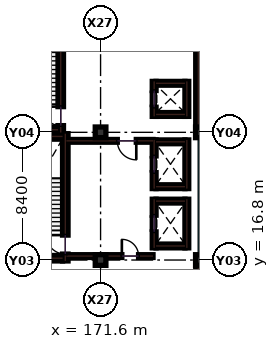
"""IFC4 building model, lengths in metres.
Left out: names, types, materials, properties, quantities, classifications, styles, units other than length and angle.
Written with IfcOpenShell. Run it as: python <this file> out.ifc"""

import sys

from ifc_helpers import new_model, si_unit, direction, frame, frame_2d, origin, origin_2d, place, context, subcontext, project, spatial, rectangle, extrude, element, fill, save


model = new_model("IFC4")
c1 = context("Model", 3, precision=1e-05, world=origin(), true_north=direction((0.0, 1.0)))
c2 = subcontext(c1, "Body", "Model", "MODEL_VIEW")
j1 = project(units=[si_unit("LENGTHUNIT", "METRE"), si_unit("PLANEANGLEUNIT", "RADIAN")], contexts=[c1])
p1 = place(None, origin())
s1 = spatial("IfcSite", under=j1, at=p1, CompositionType="ELEMENT")
p2 = place(p1, origin())
s2 = spatial("IfcBuilding", under=s1, at=p2, CompositionType="ELEMENT")
p3 = place(p2, frame((0.0, 0.0, 27.0)))
s3 = spatial("IfcBuildingStorey", under=s2, at=p3, CompositionType="ELEMENT", Elevation=27.0)
for number, where, z_axis, x_axis in (
    (1, (171.6, 16.8, 0.0), (0.0, 0.0, 1.0), (1.0, 0.0, 0.0)),
    (2, (171.6, 25.2, 0.0), (0.0, 0.0, 1.0), (1.0, 0.0, 0.0)),
    (3, (178.2, 16.8, 0.0), (0.0, 0.0, 1.0), (1.0, 0.0, 0.0)),
    (4, (178.2, 25.2, 0.0), (0.0, 0.0, 1.0), (1.0, 0.0, 0.0)),
):
    element("IfcColumn", number, at=place(p3, frame(where, z_axis=z_axis, x_axis=x_axis)), inside=s3, PredefinedType="COLUMN", context=c2, shape_type="SweptSolid", body=[
        extrude(rectangle(XDim=0.7, YDim=0.7, at=origin_2d()), origin(), (0.0, 0.0, 1.0), 4.2),
    ])
for number, where, z_axis, x_axis in (
    (5, (178.03, 8.745, 0.0), (0.0, 0.0, 1.0), (0.0, 1.0, 0.0)),
    (6, (178.03, 25.545, 0.0), (0.0, 0.0, 1.0), (0.0, 1.0, 0.0)),
):
    element("IfcWall", number, at=place(p3, frame(where, z_axis=z_axis, x_axis=x_axis)), inside=s3, PredefinedType="SHEAR", context=c2, shape_type="SweptSolid", body=[
        extrude(rectangle(XDim=7.71, YDim=0.34, at=frame_2d((3.855, 0.0))), origin(), (0.0, 0.0, 1.0), 3.98),
    ])
p4 = place(p3, frame((169.28, 16.74, 0.0), z_axis=(0.0, 0.0, 1.0), x_axis=(0.0, 1.0, 0.0)))
e7 = element("IfcWall", 7, at=p4, inside=s3, PredefinedType="SHEAR", context=c2, shape_type="SweptSolid", body=[
    extrude(rectangle(XDim=8.37, YDim=0.36, at=frame_2d((4.185, 0.0))), origin(), (0.0, 0.0, 1.0), 3.98),
])
p5 = place(p4, frame((0.45, 0.0, 0.0)))
e8 = element("IfcOpeningElement", 8, at=p5, cuts=e7, PredefinedType="OPENING", context=c2, shape_type="SweptSolid", body=[
    extrude(rectangle(XDim=1.25, YDim=2.15, at=frame_2d((0.625, 1.075))), frame((0.0, 0.19, 0.0), z_axis=(0.0, -1.0, 0.0), x_axis=(1.0, 0.0, 0.0)), (0.0, 0.0, 1.0), 0.38),
])
for number, where, z_axis, x_axis in (
    (9, (165.6, 24.93, 0.0), (0.0, 0.0, 1.0), (1.0, 0.0, 0.0)),
    (10, (165.6, 16.92, 0.0), (0.0, 0.0, 1.0), (1.0, 0.0, 0.0)),
):
    element("IfcWall", number, at=place(p3, frame(where, z_axis=z_axis, x_axis=x_axis)), inside=s3, PredefinedType="SHEAR", context=c2, shape_type="SweptSolid", body=[
        extrude(rectangle(XDim=3.5, YDim=0.36, at=frame_2d((1.75, 0.0))), origin(), (0.0, 0.0, 1.0), 3.98),
    ])
p6 = place(p3, frame((168.98, 25.19, 0.0), z_axis=(0.0, 0.0, 1.0), x_axis=(0.0, 1.0, 0.0)))
e11 = element("IfcWall", 11, at=p6, inside=s3, PredefinedType="SHEAR", context=c2, shape_type="SweptSolid", body=[
    extrude(rectangle(XDim=8.17, YDim=0.36, at=frame_2d((4.085, 0.0))), origin(), (0.0, 0.0, 1.0), 3.98),
])
p7 = place(p6, frame((0.45, 0.0, 0.0)))
e12 = element("IfcOpeningElement", 12, at=p7, cuts=e11, PredefinedType="OPENING", context=c2, shape_type="SweptSolid", body=[
    extrude(rectangle(XDim=1.25, YDim=2.15, at=frame_2d((0.625, 1.075))), frame((0.0, 0.19, 0.0), z_axis=(0.0, -1.0, 0.0), x_axis=(1.0, 0.0, 0.0)), (0.0, 0.0, 1.0), 0.38),
])
p8 = place(p3, frame((165.6, 25.37, 0.0), z_axis=(0.0, 0.0, 1.0), x_axis=(1.0, 0.0, 0.0)))
e13 = element("IfcWall", 13, at=p8, inside=s3, PredefinedType="SHEAR", context=c2, shape_type="SweptSolid", body=[
    extrude(rectangle(XDim=3.2, YDim=0.36, at=frame_2d((1.6, 0.0))), origin(), (0.0, 0.0, 1.0), 3.98),
])
p9 = place(p3, frame((175.125, 17.6, 0.0), z_axis=(0.0, 0.0, 1.0), x_axis=(0.0, 1.0, 0.0)))
e14 = element("IfcWall", 14, at=p9, inside=s3, PredefinedType="SHEAR", context=c2, shape_type="SweptSolid", body=[
    extrude(rectangle(XDim=3.2, YDim=0.25, at=frame_2d((1.6, 0.0))), origin(), (0.0, 0.0, 1.0), 3.98),
])
p10 = place(p9, frame((1.05, 0.0, 0.0)))
e15 = element("IfcOpeningElement", 15, at=p10, cuts=e14, PredefinedType="OPENING", context=c2, shape_type="SweptSolid", body=[
    extrude(rectangle(XDim=1.1, YDim=2.15, at=frame_2d((0.55, 1.075))), frame((0.0, 0.135, 0.0), z_axis=(0.0, -1.0, 0.0), x_axis=(1.0, 0.0, 0.0)), (0.0, 0.0, 1.0), 0.27),
])
p11 = place(p3, frame((177.275, 17.6, 0.0), z_axis=(0.0, 0.0, 1.0), x_axis=(0.0, 1.0, 0.0)))
e16 = element("IfcWall", 16, at=p11, inside=s3, PredefinedType="SHEAR", context=c2, shape_type="SweptSolid", body=[
    extrude(rectangle(XDim=3.2, YDim=0.25, at=frame_2d((1.6, 0.0))), origin(), (0.0, 0.0, 1.0), 3.98),
])
for number, where, z_axis, x_axis in (
    (17, (175.25, 17.725, 0.0), (0.0, 0.0, 1.0), (1.0, 0.0, 0.0)),
    (18, (175.25, 20.675, 0.0), (0.0, 0.0, 1.0), (1.0, 0.0, 0.0)),
):
    element("IfcWall", number, at=place(p3, frame(where, z_axis=z_axis, x_axis=x_axis)), inside=s3, PredefinedType="SHEAR", context=c2, shape_type="SweptSolid", body=[
        extrude(rectangle(XDim=1.9, YDim=0.25, at=frame_2d((0.95, 0.0))), origin(), (0.0, 0.0, 1.0), 3.98),
    ])
p12 = place(p3, frame((175.125, 21.5, 0.0), z_axis=(0.0, 0.0, 1.0), x_axis=(0.0, 1.0, 0.0)))
e19 = element("IfcWall", 19, at=p12, inside=s3, PredefinedType="SHEAR", context=c2, shape_type="SweptSolid", body=[
    extrude(rectangle(XDim=3.2, YDim=0.25, at=frame_2d((1.6, 0.0))), origin(), (0.0, 0.0, 1.0), 3.98),
])
p13 = place(p12, frame((1.05, 0.0, 0.0)))
e20 = element("IfcOpeningElement", 20, at=p13, cuts=e19, PredefinedType="OPENING", context=c2, shape_type="SweptSolid", body=[
    extrude(rectangle(XDim=1.1, YDim=2.15, at=frame_2d((0.55, 1.075))), frame((0.0, 0.135, 0.0), z_axis=(0.0, -1.0, 0.0), x_axis=(1.0, 0.0, 0.0)), (0.0, 0.0, 1.0), 0.27),
])
p14 = place(p3, frame((177.275, 21.5, 0.0), z_axis=(0.0, 0.0, 1.0), x_axis=(0.0, 1.0, 0.0)))
e21 = element("IfcWall", 21, at=p14, inside=s3, PredefinedType="SHEAR", context=c2, shape_type="SweptSolid", body=[
    extrude(rectangle(XDim=3.2, YDim=0.25, at=frame_2d((1.6, 0.0))), origin(), (0.0, 0.0, 1.0), 3.98),
])
for number, where, z_axis, x_axis in (
    (22, (175.25, 21.625, 0.0), (0.0, 0.0, 1.0), (1.0, 0.0, 0.0)),
    (23, (175.25, 24.575, 0.0), (0.0, 0.0, 1.0), (1.0, 0.0, 0.0)),
):
    element("IfcWall", number, at=place(p3, frame(where, z_axis=z_axis, x_axis=x_axis)), inside=s3, PredefinedType="SHEAR", context=c2, shape_type="SweptSolid", body=[
        extrude(rectangle(XDim=1.9, YDim=0.25, at=frame_2d((0.95, 0.0))), origin(), (0.0, 0.0, 1.0), 3.98),
    ])
p15 = place(p3, frame((175.125, 26.25, 0.0), z_axis=(0.0, 0.0, 1.0), x_axis=(0.0, 1.0, 0.0)))
e24 = element("IfcWall", 24, at=p15, inside=s3, PredefinedType="SHEAR", context=c2, shape_type="SweptSolid", body=[
    extrude(rectangle(XDim=2.3, YDim=0.25, at=frame_2d((1.15, 0.0))), origin(), (0.0, 0.0, 1.0), 3.98),
])
p16 = place(p15, frame((0.6, 0.0, 0.0)))
e25 = element("IfcOpeningElement", 25, at=p16, cuts=e24, PredefinedType="OPENING", context=c2, shape_type="SweptSolid", body=[
    extrude(rectangle(XDim=1.1, YDim=2.15, at=frame_2d((0.55, 1.075))), frame((0.0, 0.135, 0.0), z_axis=(0.0, -1.0, 0.0), x_axis=(1.0, 0.0, 0.0)), (0.0, 0.0, 1.0), 0.27),
])
p17 = place(p3, frame((177.275, 26.25, 0.0), z_axis=(0.0, 0.0, 1.0), x_axis=(0.0, 1.0, 0.0)))
e26 = element("IfcWall", 26, at=p17, inside=s3, PredefinedType="SHEAR", context=c2, shape_type="SweptSolid", body=[
    extrude(rectangle(XDim=2.3, YDim=0.25, at=frame_2d((1.15, 0.0))), origin(), (0.0, 0.0, 1.0), 3.98),
])
for number, where, z_axis, x_axis in (
    (27, (175.25, 26.375, 0.0), (0.0, 0.0, 1.0), (1.0, 0.0, 0.0)),
    (28, (175.25, 28.425, 0.0), (0.0, 0.0, 1.0), (1.0, 0.0, 0.0)),
):
    element("IfcWall", number, at=place(p3, frame(where, z_axis=z_axis, x_axis=x_axis)), inside=s3, PredefinedType="SHEAR", context=c2, shape_type="SweptSolid", body=[
        extrude(rectangle(XDim=1.9, YDim=0.25, at=frame_2d((0.95, 0.0))), origin(), (0.0, 0.0, 1.0), 3.98),
    ])
p18 = place(p3, frame((169.35, 24.64, 0.0), z_axis=(0.0, 0.0, 1.0), x_axis=(1.0, 0.0, 0.0)))
e29 = element("IfcWall", 29, at=p18, inside=s3, PredefinedType="SOLIDWALL", context=c2, shape_type="SweptSolid", body=[
    extrude(rectangle(XDim=5.7, YDim=0.18, at=frame_2d((2.85, 0.0))), origin(), (0.0, 0.0, 1.0), 3.98),
])
p19 = place(p18, frame((3.35, 0.0, 0.0)))
e30 = element("IfcOpeningElement", 30, at=p19, cuts=e29, PredefinedType="OPENING", context=c2, shape_type="SweptSolid", body=[
    extrude(rectangle(XDim=1.25, YDim=2.15, at=frame_2d((0.625, 1.075))), frame((0.0, 0.1, 0.0), z_axis=(0.0, -1.0, 0.0), x_axis=(1.0, 0.0, 0.0)), (0.0, 0.0, 1.0), 0.2),
])
p20 = place(p3, frame((169.35, 17.06, 0.0), z_axis=(0.0, 0.0, 1.0), x_axis=(1.0, 0.0, 0.0)))
e31 = element("IfcWall", 31, at=p20, inside=s3, PredefinedType="SOLIDWALL", context=c2, shape_type="SweptSolid", body=[
    extrude(rectangle(XDim=5.7, YDim=0.18, at=frame_2d((2.85, 0.0))), origin(), (0.0, 0.0, 1.0), 3.315),
])
p21 = place(p20, frame((3.65, 0.0, 0.0)))
e32 = element("IfcOpeningElement", 32, at=p21, cuts=e31, PredefinedType="OPENING", context=c2, shape_type="SweptSolid", body=[
    extrude(rectangle(XDim=1.1, YDim=2.15, at=frame_2d((0.55, 1.075))), frame((0.0, 0.1, 0.0), z_axis=(0.0, -1.0, 0.0), x_axis=(1.0, 0.0, 0.0)), (0.0, 0.0, 1.0), 0.2),
])
p22 = place(p5, origin())
e33 = element("IfcDoor", 33, at=p22, inside=s3, OperationType="SINGLE_SWING_RIGHT", PredefinedType="DOOR", context=c2, shape_type="SweptSolid", body=[
    extrude(rectangle(XDim=1.25, YDim=2.15, at=frame_2d((0.625, 1.075))), frame((0.0, 0.025, 0.0), z_axis=(0.0, -1.0, 0.0), x_axis=(1.0, 0.0, 0.0)), (0.0, 0.0, 1.0), 0.05),
])
fill(e8, e33)
p23 = place(p7, origin())
e34 = element("IfcDoor", 34, at=p23, inside=s3, OperationType="SINGLE_SWING_RIGHT", PredefinedType="DOOR", context=c2, shape_type="SweptSolid", body=[
    extrude(rectangle(XDim=1.25, YDim=2.15, at=frame_2d((0.625, 1.075))), frame((0.0, 0.025, 0.0), z_axis=(0.0, -1.0, 0.0), x_axis=(1.0, 0.0, 0.0)), (0.0, 0.0, 1.0), 0.05),
])
fill(e12, e34)
p24 = place(p10, origin())
e35 = element("IfcDoor", 35, at=p24, inside=s3, OperationType="SLIDING_TO_LEFT", PredefinedType="DOOR", context=c2, shape_type="SweptSolid", body=[
    extrude(rectangle(XDim=1.1, YDim=2.15, at=frame_2d((0.55, 1.075))), frame((0.0, 0.025, 0.0), z_axis=(0.0, -1.0, 0.0), x_axis=(1.0, 0.0, 0.0)), (0.0, 0.0, 1.0), 0.05),
])
fill(e15, e35)
p25 = place(p13, origin())
e36 = element("IfcDoor", 36, at=p25, inside=s3, OperationType="SLIDING_TO_LEFT", PredefinedType="DOOR", context=c2, shape_type="SweptSolid", body=[
    extrude(rectangle(XDim=1.1, YDim=2.15, at=frame_2d((0.55, 1.075))), frame((0.0, 0.025, 0.0), z_axis=(0.0, -1.0, 0.0), x_axis=(1.0, 0.0, 0.0)), (0.0, 0.0, 1.0), 0.05),
])
fill(e20, e36)
p26 = place(p16, origin())
e37 = element("IfcDoor", 37, at=p26, inside=s3, OperationType="SLIDING_TO_LEFT", PredefinedType="DOOR", context=c2, shape_type="SweptSolid", body=[
    extrude(rectangle(XDim=1.1, YDim=2.15, at=frame_2d((0.55, 1.075))), frame((0.0, 0.025, 0.0), z_axis=(0.0, -1.0, 0.0), x_axis=(1.0, 0.0, 0.0)), (0.0, 0.0, 1.0), 0.05),
])
fill(e25, e37)
p27 = place(p19, frame((1.25, 0.0, 0.0), z_axis=(0.0, 0.0, 1.0), x_axis=(-1.0, 0.0, 0.0)))
e38 = element("IfcDoor", 38, at=p27, inside=s3, OperationType="SINGLE_SWING_RIGHT", PredefinedType="DOOR", context=c2, shape_type="SweptSolid", body=[
    extrude(rectangle(XDim=1.25, YDim=2.15, at=frame_2d((0.625, 1.075))), frame((0.0, 0.025, 0.0), z_axis=(0.0, -1.0, 0.0), x_axis=(1.0, 0.0, 0.0)), (0.0, 0.0, 1.0), 0.05),
])
fill(e30, e38)
p28 = place(p21, origin())
e39 = element("IfcDoor", 39, at=p28, inside=s3, OperationType="SINGLE_SWING_LEFT", PredefinedType="DOOR", context=c2, shape_type="SweptSolid", body=[
    extrude(rectangle(XDim=1.1, YDim=2.15, at=frame_2d((0.55, 1.075))), frame((0.0, 0.025, 0.0), z_axis=(0.0, -1.0, 0.0), x_axis=(1.0, 0.0, 0.0)), (0.0, 0.0, 1.0), 0.05),
])
fill(e32, e39)
save(model, sys.argv[1])
